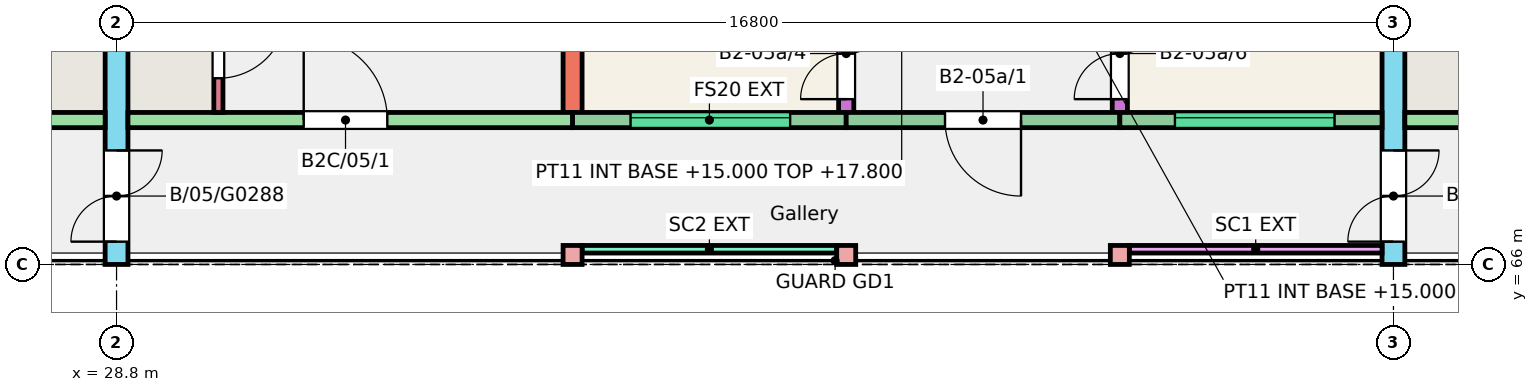
"""IFC4 building model, lengths in metres.
Left out: names, types, materials, properties, quantities, classifications, styles, units other than length and angle.
Written with IfcOpenShell. Run it as: python <this file> out.ifc"""

import sys

from ifc_helpers import new_model, si_unit, direction, frame, frame_2d, origin, origin_2d, place, context, subcontext, project, spatial, rectangle, extrude, element, fill, save


model = new_model("IFC4")
c1 = context("Model", 3, precision=1e-05, world=origin(), true_north=direction((0.0, 1.0)))
c2 = subcontext(c1, "Body", "Model", "MODEL_VIEW")
j1 = project(units=[si_unit("LENGTHUNIT", "METRE"), si_unit("PLANEANGLEUNIT", "RADIAN")], contexts=[c1])
p1 = place(None, origin())
s1 = spatial("IfcSite", under=j1, at=p1, CompositionType="ELEMENT")
p2 = place(p1, origin())
s2 = spatial("IfcBuilding", under=s1, at=p2, CompositionType="ELEMENT")
p3 = place(p2, frame((0.0, 0.0, 15.0)))
s3 = spatial("IfcBuildingStorey", under=s2, at=p3, CompositionType="ELEMENT", Elevation=15.0)
p4 = place(p3, frame((28.8, 66.0, 0.0), z_axis=(0.0, 0.0, 1.0), x_axis=(0.0, 1.0, 0.0)))
e1 = element("IfcWall", 1, at=p4, inside=s3, PredefinedType="SHEAR", context=c2, shape_type="SweptSolid", body=[
    extrude(rectangle(XDim=11.0, YDim=0.3, at=frame_2d((5.5, 0.0))), origin(), (0.0, 0.0, 1.0), 3.0),
])
p5 = place(p4, frame((0.3, 0.0, 0.0)))
e2 = element("IfcOpeningElement", 2, at=p5, cuts=e1, PredefinedType="OPENING", context=c2, shape_type="SweptSolid", body=[
    extrude(rectangle(XDim=1.2, YDim=2.1, at=frame_2d((0.6, 1.05))), frame((0.0, 0.16, 0.0), z_axis=(0.0, -1.0, 0.0), x_axis=(1.0, 0.0, 0.0)), (0.0, 0.0, 1.0), 0.32),
])
p6 = place(p3, frame((34.8, 68.0, 0.0), z_axis=(0.0, 0.0, 1.0), x_axis=(0.0, 1.0, 0.0)))
e3 = element("IfcWall", 3, at=p6, inside=s3, PredefinedType="SHEAR", context=c2, shape_type="SweptSolid", body=[
    extrude(rectangle(XDim=9.0, YDim=0.25, at=frame_2d((4.5, 0.0))), origin(), (0.0, 0.0, 1.0), 3.0),
])
p7 = place(p3, frame((38.4, 68.0, 0.0), z_axis=(0.0, 0.0, 1.0), x_axis=(0.0, 1.0, 0.0)))
e4 = element("IfcWall", 4, at=p7, inside=s3, PredefinedType="SHEAR", context=c2, shape_type="SweptSolid", body=[
    extrude(rectangle(XDim=9.0, YDim=0.2, at=frame_2d((4.5, 0.0))), origin(), (0.0, 0.0, 1.0), 3.0),
])
p8 = place(p7, frame((0.175, 0.0, 0.0)))
e5 = element("IfcOpeningElement", 5, at=p8, cuts=e4, PredefinedType="OPENING", context=c2, shape_type="SweptSolid", body=[
    extrude(rectangle(XDim=1.2, YDim=2.1, at=frame_2d((0.6, 1.05))), frame((0.0, 0.11, 0.0), z_axis=(0.0, -1.0, 0.0), x_axis=(1.0, 0.0, 0.0)), (0.0, 0.0, 1.0), 0.22),
])
p9 = place(p7, frame((6.4, 0.0, 0.0)))
e6 = element("IfcOpeningElement", 6, at=p9, cuts=e4, PredefinedType="OPENING", context=c2, shape_type="SweptSolid", body=[
    extrude(rectangle(XDim=1.2, YDim=2.1, at=frame_2d((0.6, 1.05))), frame((0.0, 0.11, 0.0), z_axis=(0.0, -1.0, 0.0), x_axis=(1.0, 0.0, 0.0)), (0.0, 0.0, 1.0), 0.22),
])
p10 = place(p3, frame((42.0, 68.0, 0.0), z_axis=(0.0, 0.0, 1.0), x_axis=(0.0, 1.0, 0.0)))
e7 = element("IfcWall", 7, at=p10, inside=s3, PredefinedType="SHEAR", context=c2, shape_type="SweptSolid", body=[
    extrude(rectangle(XDim=9.0, YDim=0.2, at=frame_2d((4.5, 0.0))), origin(), (0.0, 0.0, 1.0), 3.0),
])
p11 = place(p10, frame((0.175, 0.0, 0.0)))
e8 = element("IfcOpeningElement", 8, at=p11, cuts=e7, PredefinedType="OPENING", context=c2, shape_type="SweptSolid", body=[
    extrude(rectangle(XDim=1.2, YDim=2.1, at=frame_2d((0.6, 1.05))), frame((0.0, 0.11, 0.0), z_axis=(0.0, -1.0, 0.0), x_axis=(1.0, 0.0, 0.0)), (0.0, 0.0, 1.0), 0.22),
])
p12 = place(p10, frame((6.4, 0.0, 0.0)))
e9 = element("IfcOpeningElement", 9, at=p12, cuts=e7, PredefinedType="OPENING", context=c2, shape_type="SweptSolid", body=[
    extrude(rectangle(XDim=1.2, YDim=2.1, at=frame_2d((0.6, 1.05))), frame((0.0, 0.11, 0.0), z_axis=(0.0, -1.0, 0.0), x_axis=(1.0, 0.0, 0.0)), (0.0, 0.0, 1.0), 0.22),
])
p13 = place(p3, frame((45.6, 66.0, 0.0), z_axis=(0.0, 0.0, 1.0), x_axis=(0.0, 1.0, 0.0)))
e10 = element("IfcWall", 10, at=p13, inside=s3, PredefinedType="SHEAR", context=c2, shape_type="SweptSolid", body=[
    extrude(rectangle(XDim=11.0, YDim=0.3, at=frame_2d((5.5, 0.0))), origin(), (0.0, 0.0, 1.0), 3.0),
])
p14 = place(p13, frame((0.3, 0.0, 0.0)))
e11 = element("IfcOpeningElement", 11, at=p14, cuts=e10, PredefinedType="OPENING", context=c2, shape_type="SweptSolid", body=[
    extrude(rectangle(XDim=1.2, YDim=2.1, at=frame_2d((0.6, 1.05))), frame((0.0, 0.16, 0.0), z_axis=(0.0, -1.0, 0.0), x_axis=(1.0, 0.0, 0.0)), (0.0, 0.0, 1.0), 0.32),
])
p15 = place(p3, frame((22.8, 67.9, 0.0), z_axis=(0.0, 0.0, 1.0), x_axis=(1.0, 0.0, 0.0)))
e12 = element("IfcWall", 12, at=p15, inside=s3, PredefinedType="SHEAR", context=c2, shape_type="SweptSolid", body=[
    extrude(rectangle(XDim=5.85, YDim=0.2, at=frame_2d((2.925, 0.0))), origin(), (0.0, 0.0, 1.0), 3.0),
])
p16 = place(p15, frame((2.438, 0.0, 0.0)))
e13 = element("IfcOpeningElement", 13, at=p16, cuts=e12, PredefinedType="OPENING", context=c2, shape_type="SweptSolid", body=[
    extrude(rectangle(XDim=1.1, YDim=2.1, at=frame_2d((0.55, 1.05))), frame((0.0, 0.11, 0.0), z_axis=(0.0, -1.0, 0.0), x_axis=(1.0, 0.0, 0.0)), (0.0, 0.0, 1.0), 0.22),
])
p17 = place(p3, frame((28.95, 67.9, 0.0), z_axis=(0.0, 0.0, 1.0), x_axis=(1.0, 0.0, 0.0)))
e14 = element("IfcWall", 14, at=p17, inside=s3, PredefinedType="SHEAR", context=c2, shape_type="SweptSolid", body=[
    extrude(rectangle(XDim=5.85, YDim=0.2, at=frame_2d((2.925, 0.0))), origin(), (0.0, 0.0, 1.0), 3.0),
])
p18 = place(p17, frame((2.312, 0.0, 0.0)))
e15 = element("IfcOpeningElement", 15, at=p18, cuts=e14, PredefinedType="OPENING", context=c2, shape_type="SweptSolid", body=[
    extrude(rectangle(XDim=1.1, YDim=2.1, at=frame_2d((0.55, 1.05))), frame((0.0, 0.11, 0.0), z_axis=(0.0, -1.0, 0.0), x_axis=(1.0, 0.0, 0.0)), (0.0, 0.0, 1.0), 0.22),
])
p19 = place(p3, frame((30.14, 68.0, 0.0), z_axis=(0.0, 0.0, 1.0), x_axis=(0.0, 1.0, 0.0)))
e16 = element("IfcWall", 16, at=p19, inside=s3, PredefinedType="SHEAR", context=c2, shape_type="SweptSolid", body=[
    extrude(rectangle(XDim=1.72, YDim=0.12, at=frame_2d((0.86, 0.0))), origin(), (0.0, 0.0, 1.0), 3.0),
])
p20 = place(p19, frame((0.45, 0.0, 0.0)))
e17 = element("IfcOpeningElement", 17, at=p20, cuts=e16, PredefinedType="OPENING", context=c2, shape_type="SweptSolid", body=[
    extrude(rectangle(XDim=0.9, YDim=2.1, at=frame_2d((0.45, 1.05))), frame((0.0, 0.07, 0.0), z_axis=(0.0, -1.0, 0.0), x_axis=(1.0, 0.0, 0.0)), (0.0, 0.0, 1.0), 0.14),
])
p21 = place(p3, frame((34.8, 67.9, 0.0), z_axis=(0.0, 0.0, 1.0), x_axis=(1.0, 0.0, 0.0)))
e18 = element("IfcWall", 18, at=p21, inside=s3, PredefinedType="SOLIDWALL", context=c2, shape_type="SweptSolid", body=[
    extrude(rectangle(XDim=3.6, YDim=0.2, at=frame_2d((1.8, 0.0))), origin(), (0.0, 0.0, 1.0), 3.0),
])
p22 = place(p21, frame((0.762, 0.0, 1.2)))
e19 = element("IfcOpeningElement", 19, at=p22, cuts=e18, PredefinedType="OPENING", context=c2, shape_type="SweptSolid", body=[
    extrude(rectangle(XDim=2.1, YDim=1.2, at=frame_2d((1.05, 0.6))), frame((0.0, 0.11, 0.0), z_axis=(0.0, -1.0, 0.0), x_axis=(1.0, 0.0, 0.0)), (0.0, 0.0, 1.0), 0.22),
])
p23 = place(p3, frame((38.4, 67.9, 0.0), z_axis=(0.0, 0.0, 1.0), x_axis=(1.0, 0.0, 0.0)))
e20 = element("IfcWall", 20, at=p23, inside=s3, PredefinedType="SOLIDWALL", context=c2, shape_type="SweptSolid", body=[
    extrude(rectangle(XDim=3.6, YDim=0.2, at=frame_2d((1.8, 0.0))), origin(), (0.0, 0.0, 1.0), 3.0),
])
p24 = place(p23, frame((1.3, 0.0, 0.0)))
e21 = element("IfcOpeningElement", 21, at=p24, cuts=e20, PredefinedType="OPENING", context=c2, shape_type="SweptSolid", body=[
    extrude(rectangle(XDim=1.0, YDim=2.1, at=frame_2d((0.5, 1.05))), frame((0.0, 0.11, 0.0), z_axis=(0.0, -1.0, 0.0), x_axis=(1.0, 0.0, 0.0)), (0.0, 0.0, 1.0), 0.22),
])
p25 = place(p3, frame((42.0, 67.9, 0.0), z_axis=(0.0, 0.0, 1.0), x_axis=(1.0, 0.0, 0.0)))
e22 = element("IfcWall", 22, at=p25, inside=s3, PredefinedType="SOLIDWALL", context=c2, shape_type="SweptSolid", body=[
    extrude(rectangle(XDim=3.45, YDim=0.2, at=frame_2d((1.725, 0.0))), origin(), (0.0, 0.0, 1.0), 3.0),
])
p26 = place(p25, frame((0.725, 0.0, 1.2)))
e23 = element("IfcOpeningElement", 23, at=p26, cuts=e22, PredefinedType="OPENING", context=c2, shape_type="SweptSolid", body=[
    extrude(rectangle(XDim=2.1, YDim=1.2, at=frame_2d((1.05, 0.6))), frame((0.0, 0.11, 0.0), z_axis=(0.0, -1.0, 0.0), x_axis=(1.0, 0.0, 0.0)), (0.0, 0.0, 1.0), 0.22),
])
p27 = place(p3, frame((45.75, 67.9, 0.0), z_axis=(0.0, 0.0, 1.0), x_axis=(1.0, 0.0, 0.0)))
e24 = element("IfcWall", 24, at=p27, inside=s3, PredefinedType="SHEAR", context=c2, shape_type="SweptSolid", body=[
    extrude(rectangle(XDim=5.85, YDim=0.2, at=frame_2d((2.925, 0.0))), origin(), (0.0, 0.0, 1.0), 3.0),
])
p28 = place(p27, frame((2.312, 0.0, 0.0)))
e25 = element("IfcOpeningElement", 25, at=p28, cuts=e24, PredefinedType="OPENING", context=c2, shape_type="SweptSolid", body=[
    extrude(rectangle(XDim=1.1, YDim=2.1, at=frame_2d((0.55, 1.05))), frame((0.0, 0.11, 0.0), z_axis=(0.0, -1.0, 0.0), x_axis=(1.0, 0.0, 0.0)), (0.0, 0.0, 1.0), 0.22),
])
for number, where, z_axis, x_axis in (
    (26, (34.8, 66.125, 0.0), (0.0, 0.0, 1.0), (1.0, 0.0, 0.0)),
    (27, (38.4, 66.125, 0.0), (0.0, 0.0, 1.0), (1.0, 0.0, 0.0)),
    (28, (42.0, 66.125, 0.0), (0.0, 0.0, 1.0), (1.0, 0.0, 0.0)),
):
    element("IfcColumn", number, at=place(p3, frame(where, z_axis=z_axis, x_axis=x_axis)), inside=s3, PredefinedType="COLUMN", context=c2, shape_type="SweptSolid", body=[
        extrude(rectangle(XDim=0.25, YDim=0.25, at=origin_2d()), origin(), (0.0, 0.0, 1.0), 3.0),
    ])
p29 = place(p3, frame((34.925, 66.2, 0.0), z_axis=(0.0, 0.0, 1.0), x_axis=(1.0, 0.0, 0.0)))
e29 = element("IfcWall", 29, at=p29, inside=s3, PredefinedType="SOLIDWALL", context=c2, shape_type="SweptSolid", body=[
    extrude(rectangle(XDim=3.35, YDim=0.1, at=frame_2d((1.675, 0.0))), origin(), (0.0, 0.0, 1.0), 2.45),
])
p30 = place(p3, frame((42.125, 66.2, 0.0), z_axis=(0.0, 0.0, 1.0), x_axis=(1.0, 0.0, 0.0)))
e30 = element("IfcWall", 30, at=p30, inside=s3, PredefinedType="SOLIDWALL", context=c2, shape_type="SweptSolid", body=[
    extrude(rectangle(XDim=3.325, YDim=0.1, at=frame_2d((1.663, 0.0))), origin(), (0.0, 0.0, 1.0), 2.45),
])
p31 = place(p22, origin())
e31 = element("IfcWindow", 31, at=p31, inside=s3, PartitioningType="SINGLE_PANEL", PredefinedType="WINDOW", context=c2, shape_type="SweptSolid", body=[
    extrude(rectangle(XDim=2.1, YDim=1.2, at=frame_2d((1.05, 0.6))), frame((0.0, 0.06, 0.0), z_axis=(0.0, -1.0, 0.0), x_axis=(1.0, 0.0, 0.0)), (0.0, 0.0, 1.0), 0.06),
])
fill(e19, e31)
p32 = place(p26, origin())
e32 = element("IfcWindow", 32, at=p32, inside=s3, PartitioningType="SINGLE_PANEL", PredefinedType="WINDOW", context=c2, shape_type="SweptSolid", body=[
    extrude(rectangle(XDim=2.1, YDim=1.2, at=frame_2d((1.05, 0.6))), frame((0.0, 0.06, 0.0), z_axis=(0.0, -1.0, 0.0), x_axis=(1.0, 0.0, 0.0)), (0.0, 0.0, 1.0), 0.06),
])
fill(e23, e32)
p33 = place(p24, origin())
e33 = element("IfcDoor", 33, at=p33, inside=s3, OperationType="SINGLE_SWING_RIGHT", PredefinedType="DOOR", context=c2, shape_type="SweptSolid", body=[
    extrude(rectangle(XDim=1.0, YDim=2.1, at=frame_2d((0.5, 1.05))), frame((0.0, 0.025, 0.0), z_axis=(0.0, -1.0, 0.0), x_axis=(1.0, 0.0, 0.0)), (0.0, 0.0, 1.0), 0.05),
])
fill(e21, e33)
p34 = place(p8, origin())
e34 = element("IfcDoor", 34, at=p34, inside=s3, OperationType="DOUBLE_DOOR_SINGLE_SWING", PredefinedType="DOOR", context=c2, shape_type="SweptSolid", body=[
    extrude(rectangle(XDim=1.2, YDim=2.1, at=frame_2d((0.6, 1.05))), frame((0.0, 0.025, 0.0), z_axis=(0.0, -1.0, 0.0), x_axis=(1.0, 0.0, 0.0)), (0.0, 0.0, 1.0), 0.05),
])
fill(e5, e34)
p35 = place(p11, origin())
e35 = element("IfcDoor", 35, at=p35, inside=s3, OperationType="DOUBLE_DOOR_SINGLE_SWING", PredefinedType="DOOR", context=c2, shape_type="SweptSolid", body=[
    extrude(rectangle(XDim=1.2, YDim=2.1, at=frame_2d((0.6, 1.05))), frame((0.0, 0.025, 0.0), z_axis=(0.0, -1.0, 0.0), x_axis=(1.0, 0.0, 0.0)), (0.0, 0.0, 1.0), 0.05),
])
fill(e8, e35)
p36 = place(p18, origin())
e36 = element("IfcDoor", 36, at=p36, inside=s3, OperationType="SINGLE_SWING_LEFT", PredefinedType="DOOR", context=c2, shape_type="SweptSolid", body=[
    extrude(rectangle(XDim=1.1, YDim=2.1, at=frame_2d((0.55, 1.05))), frame((0.0, 0.025, 0.0), z_axis=(0.0, -1.0, 0.0), x_axis=(1.0, 0.0, 0.0)), (0.0, 0.0, 1.0), 0.05),
])
fill(e15, e36)
p37 = place(p20, origin())
e37 = element("IfcDoor", 37, at=p37, inside=s3, OperationType="SINGLE_SWING_RIGHT", PredefinedType="DOOR", context=c2, shape_type="SweptSolid", body=[
    extrude(rectangle(XDim=0.9, YDim=2.1, at=frame_2d((0.45, 1.05))), frame((0.0, 0.025, 0.0), z_axis=(0.0, -1.0, 0.0), x_axis=(1.0, 0.0, 0.0)), (0.0, 0.0, 1.0), 0.05),
])
fill(e17, e37)
p38 = place(p5, origin())
e38 = element("IfcDoor", 38, at=p38, inside=s3, OperationType="DOUBLE_DOOR_SINGLE_SWING", PredefinedType="DOOR", context=c2, shape_type="SweptSolid", body=[
    extrude(rectangle(XDim=1.2, YDim=2.1, at=frame_2d((0.6, 1.05))), frame((0.0, 0.025, 0.0), z_axis=(0.0, -1.0, 0.0), x_axis=(1.0, 0.0, 0.0)), (0.0, 0.0, 1.0), 0.05),
])
fill(e2, e38)
p39 = place(p14, origin())
e39 = element("IfcDoor", 39, at=p39, inside=s3, OperationType="DOUBLE_DOOR_SINGLE_SWING", PredefinedType="DOOR", context=c2, shape_type="SweptSolid", body=[
    extrude(rectangle(XDim=1.2, YDim=2.1, at=frame_2d((0.6, 1.05))), frame((0.0, 0.025, 0.0), z_axis=(0.0, -1.0, 0.0), x_axis=(1.0, 0.0, 0.0)), (0.0, 0.0, 1.0), 0.05),
])
fill(e11, e39)
save(model, sys.argv[1])
